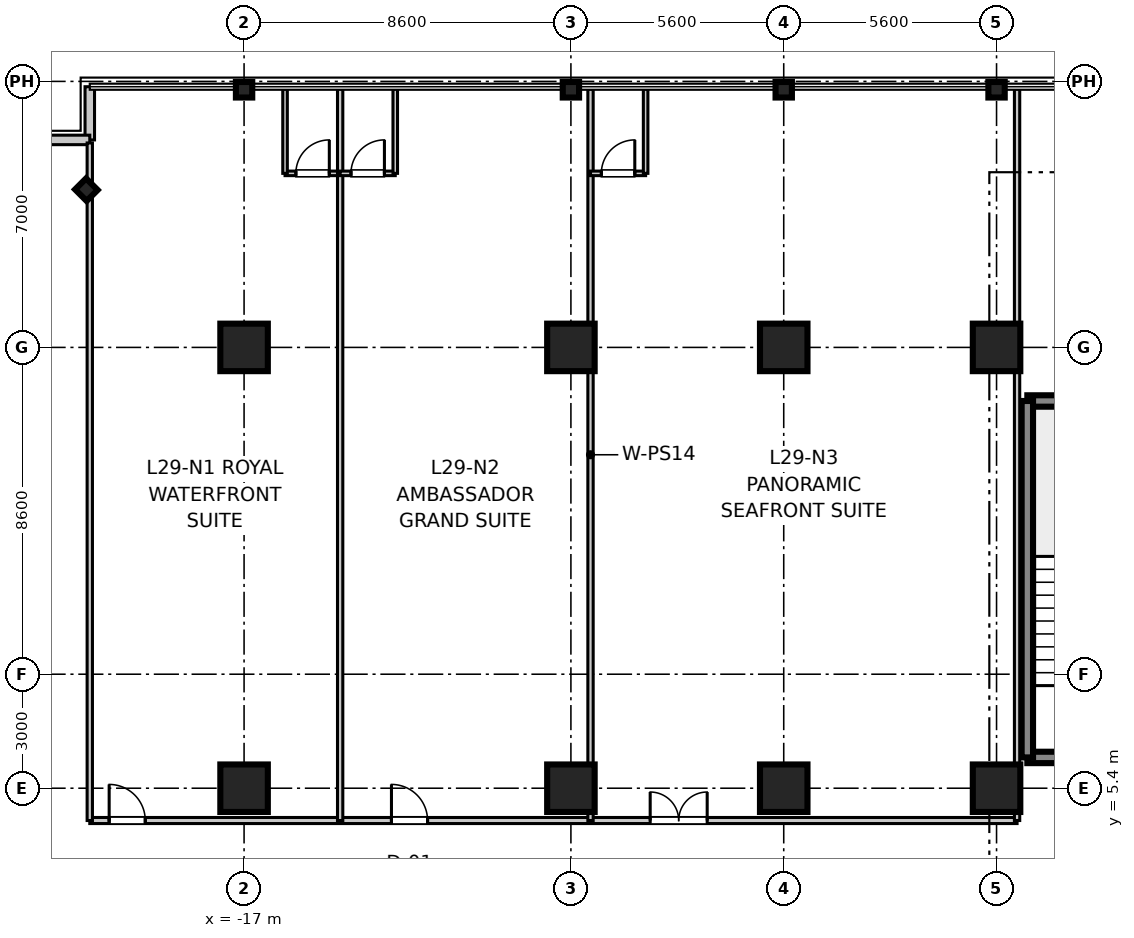
"""IFC4 building model, lengths in metres.
Left out: names, types, materials, properties, quantities, classifications, styles, units other than length and angle.
Written with IfcOpenShell. Run it as: python <this file> out.ifc"""

import sys

from ifc_helpers import new_model, si_unit, direction, frame, frame_2d, origin, origin_2d, place, context, subcontext, project, spatial, rectangle, i_section, extrude, source, transform, mapped, element, fill, save


model = new_model("IFC4")
c1 = context("Model", 3, precision=1e-05, world=origin(), true_north=direction((0.0, 1.0)))
c2 = subcontext(c1, "Body", "Model", "MODEL_VIEW")
j1 = project(units=[si_unit("LENGTHUNIT", "METRE"), si_unit("PLANEANGLEUNIT", "RADIAN")], contexts=[c1])
p1 = place(None, origin())
s1 = spatial("IfcSite", under=j1, at=p1, CompositionType="ELEMENT")
p2 = place(p1, origin())
s2 = spatial("IfcBuilding", under=s1, at=p2, CompositionType="ELEMENT")
p3 = place(p2, frame((0.0, 0.0, 117.5)))
s3 = spatial("IfcBuildingStorey", under=s2, at=p3, CompositionType="ELEMENT", Elevation=117.5)
m1 = source(origin(), c2, "Body", "SweptSolid", [
    extrude(rectangle(XDim=1.25, YDim=1.25, at=origin_2d()), origin(), (0.0, 0.0, 1.0), 3.605),
])
for number, where, z_axis, x_axis in (
    (1, (-17.0, 5.4, 0.0), (0.0, 0.0, 1.0), (1.0, 0.0, 0.0)),
    (2, (-17.0, 17.0, 0.0), (0.0, 0.0, 1.0), (1.0, 0.0, 0.0)),
    (3, (-8.4, 5.4, 0.0), (0.0, 0.0, 1.0), (1.0, 0.0, 0.0)),
    (4, (-8.4, 17.0, 0.0), (0.0, 0.0, 1.0), (1.0, 0.0, 0.0)),
    (5, (-2.8, 5.4, 0.0), (0.0, 0.0, 1.0), (1.0, 0.0, 0.0)),
    (6, (-2.8, 17.0, 0.0), (0.0, 0.0, 1.0), (1.0, 0.0, 0.0)),
    (7, (2.8, 5.4, 0.0), (0.0, 0.0, 1.0), (1.0, 0.0, 0.0)),
    (8, (2.8, 17.0, 0.0), (0.0, 0.0, 1.0), (1.0, 0.0, 0.0)),
):
    element("IfcColumn", number, at=place(p3, frame(where, z_axis=z_axis, x_axis=x_axis)), inside=s3, PredefinedType="COLUMN", context=c2, shape_type="MappedRepresentation", body=[
        mapped(m1, transform((0.0, 0.0, 0.0), scale=1.0)),
    ])
m2 = source(origin(), c2, "Body", "SweptSolid", [
    extrude(i_section(OverallWidth=0.409, OverallDepth=0.43, WebThickness=0.021, FlangeThickness=0.034, at=origin_2d()), origin(), (0.0, 0.0, 1.0), 3.605),
])
for number, where, z_axis, x_axis in (
    (9, (-17.0, 23.78, 0.0), (0.0, 0.0, 1.0), (0.0, 1.0, 0.0)),
    (10, (-8.4, 23.78, 0.0), (0.0, 0.0, 1.0), (0.0, 1.0, 0.0)),
    (11, (-2.8, 23.78, 0.0), (0.0, 0.0, 1.0), (0.0, 1.0, 0.0)),
    (12, (2.8, 23.78, 0.0), (0.0, 0.0, 1.0), (0.0, 1.0, 0.0)),
    (13, (-21.15, 21.15, 0.0), (0.0, 0.0, 1.0), (0.707, 0.707, 0.0)),
):
    element("IfcColumn", number, at=place(p3, frame(where, z_axis=z_axis, x_axis=x_axis)), inside=s3, PredefinedType="COLUMN", context=c2, shape_type="MappedRepresentation", body=[
        mapped(m2, transform((0.0, 0.0, 0.0), scale=1.0)),
    ])
m3 = source(origin(), c2, "Body", "SweptSolid", [
    extrude(rectangle(XDim=3.98, YDim=0.3, at=frame_2d((1.99, 0.0))), origin(), (0.0, 0.0, 1.0), 3.38),
])
for number, where, z_axis, x_axis in (
    (14, (3.61, 6.21, 0.0), (0.0, 0.0, 1.0), (1.0, 0.0, 0.0)),
    (15, (3.61, 15.59, 0.0), (0.0, 0.0, 1.0), (1.0, 0.0, 0.0)),
):
    element("IfcWall", number, at=place(p3, frame(where, z_axis=z_axis, x_axis=x_axis)), inside=s3, PredefinedType="SHEAR", context=c2, shape_type="MappedRepresentation", body=[
        mapped(m3, transform((0.0, 0.0, 0.0), scale=1.0)),
    ])
m4 = source(origin(), c2, "Body", "SweptSolid", [
    extrude(rectangle(XDim=9.38, YDim=0.3, at=frame_2d((4.69, 0.0))), origin(), (0.0, 0.0, 1.0), 3.38),
])
p4 = place(p3, frame((3.61, 6.21, 0.0), z_axis=(0.0, 0.0, 1.0), x_axis=(0.0, 1.0, 0.0)))
e16 = element("IfcWall", 16, at=p4, inside=s3, PredefinedType="SHEAR", context=c2, shape_type="MappedRepresentation", body=[
    mapped(m4, transform((0.0, 0.0, 0.0), scale=1.0)),
])
m5 = source(origin(), c2, "Body", "SweptSolid", [
    extrude(rectangle(XDim=1.4, YDim=0.25, at=frame_2d((0.7, 0.0))), origin(), (0.0, 0.0, 1.0), 3.38),
])
p5 = place(p3, frame((-21.06, 22.46, 0.0), z_axis=(0.0, 0.0, 1.0), x_axis=(0.0, 1.0, 0.0)))
e17 = element("IfcWall", 17, at=p5, inside=s3, PredefinedType="STANDARD", context=c2, shape_type="MappedRepresentation", body=[
    mapped(m5, transform((0.0, 0.0, 0.0), scale=1.0)),
])
m6 = source(origin(), c2, "Body", "SweptSolid", [
    extrude(rectangle(XDim=1.4, YDim=0.25, at=frame_2d((0.7, 0.0))), origin(), (0.0, 0.0, 1.0), 3.38),
])
p6 = place(p3, frame((-22.46, 22.46, 0.0), z_axis=(0.0, 0.0, 1.0), x_axis=(1.0, 0.0, 0.0)))
e18 = element("IfcWall", 18, at=p6, inside=s3, PredefinedType="STANDARD", context=c2, shape_type="MappedRepresentation", body=[
    mapped(m6, transform((0.0, 0.0, 0.0), scale=1.0)),
])
m7 = source(origin(), c2, "Body", "SweptSolid", [
    extrude(rectangle(XDim=24.4, YDim=0.16, at=frame_2d((12.2, 0.0))), origin(), (0.0, 0.0, 1.0), 2.72),
])
p7 = place(p3, frame((-21.06, 4.55, 0.0), z_axis=(0.0, 0.0, 1.0), x_axis=(1.0, 0.0, 0.0)))
e19 = element("IfcWall", 19, at=p7, inside=s3, PredefinedType="PARTITIONING", context=c2, shape_type="MappedRepresentation", body=[
    mapped(m7, transform((0.0, 0.0, 0.0), scale=1.0)),
])
p8 = place(p7, frame((0.51, 0.0, 0.0)))
e20 = element("IfcOpeningElement", 20, at=p8, cuts=e19, PredefinedType="OPENING", context=c2, shape_type="SweptSolid", body=[
    extrude(rectangle(XDim=0.95, YDim=2.1, at=frame_2d((0.475, 1.05))), frame((0.0, 0.09, 0.0), z_axis=(0.0, -1.0, 0.0), x_axis=(1.0, 0.0, 0.0)), (0.0, 0.0, 1.0), 0.18),
])
p9 = place(p7, frame((7.938, 0.0, 0.0)))
e21 = element("IfcOpeningElement", 21, at=p9, cuts=e19, PredefinedType="OPENING", context=c2, shape_type="SweptSolid", body=[
    extrude(rectangle(XDim=0.95, YDim=2.1, at=frame_2d((0.475, 1.05))), frame((0.0, 0.09, 0.0), z_axis=(0.0, -1.0, 0.0), x_axis=(1.0, 0.0, 0.0)), (0.0, 0.0, 1.0), 0.18),
])
p10 = place(p7, frame((14.746, 0.0, 0.0)))
e22 = element("IfcOpeningElement", 22, at=p10, cuts=e19, PredefinedType="OPENING", context=c2, shape_type="SweptSolid", body=[
    extrude(rectangle(XDim=1.5, YDim=2.15, at=frame_2d((0.75, 1.075))), frame((0.0, 0.09, 0.0), z_axis=(0.0, -1.0, 0.0), x_axis=(1.0, 0.0, 0.0)), (0.0, 0.0, 1.0), 0.18),
])
m8 = source(origin(), c2, "Body", "SweptSolid", [
    extrude(rectangle(XDim=17.83, YDim=0.14, at=frame_2d((8.915, 0.0))), origin(), (0.0, 0.0, 1.0), 2.72),
])
p11 = place(p3, frame((-21.06, 4.55, 0.0), z_axis=(0.0, 0.0, 1.0), x_axis=(0.0, 1.0, 0.0)))
e23 = element("IfcWall", 23, at=p11, inside=s3, PredefinedType="PARTITIONING", context=c2, shape_type="MappedRepresentation", body=[
    mapped(m8, transform((0.0, 0.0, 0.0), scale=1.0)),
])
m9 = source(origin(), c2, "Body", "SweptSolid", [
    extrude(rectangle(XDim=19.25, YDim=0.14, at=frame_2d((9.625, 0.0))), origin(), (0.0, 0.0, 1.0), 2.72),
])
p12 = place(p3, frame((3.34, 4.55, 0.0), z_axis=(0.0, 0.0, 1.0), x_axis=(0.0, 1.0, 0.0)))
e24 = element("IfcWall", 24, at=p12, inside=s3, PredefinedType="PARTITIONING", context=c2, shape_type="MappedRepresentation", body=[
    mapped(m9, transform((0.0, 0.0, 0.0), scale=1.0)),
])
m10 = source(origin(), c2, "Body", "SweptSolid", [
    extrude(rectangle(XDim=1.45, YDim=0.12, at=frame_2d((0.725, 0.0))), origin(), (0.0, 0.0, 1.0), 2.72),
])
p13 = place(p3, frame((-15.922, 21.58, 0.0), z_axis=(0.0, 0.0, 1.0), x_axis=(1.0, 0.0, 0.0)))
e25 = element("IfcWall", 25, at=p13, inside=s3, PredefinedType="PARTITIONING", context=c2, shape_type="MappedRepresentation", body=[
    mapped(m10, transform((0.0, 0.0, 0.0), scale=1.0)),
])
p14 = place(p13, frame((0.285, 0.0, 0.0)))
e26 = element("IfcOpeningElement", 26, at=p14, cuts=e25, PredefinedType="OPENING", context=c2, shape_type="SweptSolid", body=[
    extrude(rectangle(XDim=0.88, YDim=2.1, at=frame_2d((0.44, 1.05))), frame((0.0, 0.07, 0.0), z_axis=(0.0, -1.0, 0.0), x_axis=(1.0, 0.0, 0.0)), (0.0, 0.0, 1.0), 0.14),
])
m11 = source(origin(), c2, "Body", "SweptSolid", [
    extrude(rectangle(XDim=2.22, YDim=0.12, at=frame_2d((1.11, 0.0))), origin(), (0.0, 0.0, 1.0), 2.72),
])
p15 = place(p3, frame((-15.922, 21.58, 0.0), z_axis=(0.0, 0.0, 1.0), x_axis=(0.0, 1.0, 0.0)))
e27 = element("IfcWall", 27, at=p15, inside=s3, PredefinedType="PARTITIONING", context=c2, shape_type="MappedRepresentation", body=[
    mapped(m11, transform((0.0, 0.0, 0.0), scale=1.0)),
])
p16 = place(p3, frame((-14.472, 4.55, 0.0), z_axis=(0.0, 0.0, 1.0), x_axis=(0.0, 1.0, 0.0)))
e28 = element("IfcWall", 28, at=p16, inside=s3, PredefinedType="PARTITIONING", context=c2, shape_type="MappedRepresentation", body=[
    mapped(m9, transform((0.0, 0.0, 0.0), scale=1.0)),
])
m12 = source(origin(), c2, "Body", "SweptSolid", [
    extrude(rectangle(XDim=1.45, YDim=0.12, at=frame_2d((0.725, 0.0))), origin(), (0.0, 0.0, 1.0), 2.72),
])
p17 = place(p3, frame((-14.472, 21.58, 0.0), z_axis=(0.0, 0.0, 1.0), x_axis=(1.0, 0.0, 0.0)))
e29 = element("IfcWall", 29, at=p17, inside=s3, PredefinedType="PARTITIONING", context=c2, shape_type="MappedRepresentation", body=[
    mapped(m12, transform((0.0, 0.0, 0.0), scale=1.0)),
])
p18 = place(p17, frame((0.285, 0.0, 0.0)))
e30 = element("IfcOpeningElement", 30, at=p18, cuts=e29, PredefinedType="OPENING", context=c2, shape_type="SweptSolid", body=[
    extrude(rectangle(XDim=0.88, YDim=2.1, at=frame_2d((0.44, 1.05))), frame((0.0, 0.07, 0.0), z_axis=(0.0, -1.0, 0.0), x_axis=(1.0, 0.0, 0.0)), (0.0, 0.0, 1.0), 0.14),
])
p19 = place(p3, frame((-13.022, 21.58, 0.0), z_axis=(0.0, 0.0, 1.0), x_axis=(0.0, 1.0, 0.0)))
e31 = element("IfcWall", 31, at=p19, inside=s3, PredefinedType="PARTITIONING", context=c2, shape_type="MappedRepresentation", body=[
    mapped(m11, transform((0.0, 0.0, 0.0), scale=1.0)),
])
p20 = place(p3, frame((-7.884, 4.55, 0.0), z_axis=(0.0, 0.0, 1.0), x_axis=(0.0, 1.0, 0.0)))
e32 = element("IfcWall", 32, at=p20, inside=s3, PredefinedType="PARTITIONING", context=c2, shape_type="MappedRepresentation", body=[
    mapped(m9, transform((0.0, 0.0, 0.0), scale=1.0)),
])
p21 = place(p3, frame((-7.884, 21.58, 0.0), z_axis=(0.0, 0.0, 1.0), x_axis=(1.0, 0.0, 0.0)))
e33 = element("IfcWall", 33, at=p21, inside=s3, PredefinedType="PARTITIONING", context=c2, shape_type="MappedRepresentation", body=[
    mapped(m12, transform((0.0, 0.0, 0.0), scale=1.0)),
])
p22 = place(p21, frame((0.285, 0.0, 0.0)))
e34 = element("IfcOpeningElement", 34, at=p22, cuts=e33, PredefinedType="OPENING", context=c2, shape_type="SweptSolid", body=[
    extrude(rectangle(XDim=0.88, YDim=2.1, at=frame_2d((0.44, 1.05))), frame((0.0, 0.07, 0.0), z_axis=(0.0, -1.0, 0.0), x_axis=(1.0, 0.0, 0.0)), (0.0, 0.0, 1.0), 0.14),
])
p23 = place(p3, frame((-6.434, 21.58, 0.0), z_axis=(0.0, 0.0, 1.0), x_axis=(0.0, 1.0, 0.0)))
e35 = element("IfcWall", 35, at=p23, inside=s3, PredefinedType="PARTITIONING", context=c2, shape_type="MappedRepresentation", body=[
    mapped(m11, transform((0.0, 0.0, 0.0), scale=1.0)),
])
m13 = source(origin(), c2, "Body", "SweptSolid", [
    extrude(rectangle(XDim=0.88, YDim=2.1, at=frame_2d((0.44, 1.05))), frame((0.0, 0.025, 0.0), z_axis=(0.0, -1.0, 0.0), x_axis=(1.0, 0.0, 0.0)), (0.0, 0.0, 1.0), 0.05),
])
p24 = place(p14, origin())
e36 = element("IfcDoor", 36, at=p24, inside=s3, OperationType="SINGLE_SWING_RIGHT", PredefinedType="DOOR", context=c2, shape_type="MappedRepresentation", body=[
    mapped(m13, transform((0.0, 0.0, 0.0), scale=1.0)),
])
fill(e26, e36)
m14 = source(origin(), c2, "Body", "SweptSolid", [
    extrude(rectangle(XDim=0.95, YDim=2.1, at=frame_2d((0.475, 1.05))), frame((0.0, 0.025, 0.0), z_axis=(0.0, -1.0, 0.0), x_axis=(1.0, 0.0, 0.0)), (0.0, 0.0, 1.0), 0.05),
])
p25 = place(p8, origin())
e37 = element("IfcDoor", 37, at=p25, inside=s3, OperationType="SINGLE_SWING_LEFT", PredefinedType="DOOR", context=c2, shape_type="MappedRepresentation", body=[
    mapped(m14, transform((0.0, 0.0, 0.0), scale=1.0)),
])
fill(e20, e37)
p26 = place(p18, origin())
e38 = element("IfcDoor", 38, at=p26, inside=s3, OperationType="SINGLE_SWING_RIGHT", PredefinedType="DOOR", context=c2, shape_type="MappedRepresentation", body=[
    mapped(m13, transform((0.0, 0.0, 0.0), scale=1.0)),
])
fill(e30, e38)
p27 = place(p9, origin())
e39 = element("IfcDoor", 39, at=p27, inside=s3, OperationType="SINGLE_SWING_LEFT", PredefinedType="DOOR", context=c2, shape_type="MappedRepresentation", body=[
    mapped(m14, transform((0.0, 0.0, 0.0), scale=1.0)),
])
fill(e21, e39)
p28 = place(p22, origin())
e40 = element("IfcDoor", 40, at=p28, inside=s3, OperationType="SINGLE_SWING_RIGHT", PredefinedType="DOOR", context=c2, shape_type="MappedRepresentation", body=[
    mapped(m13, transform((0.0, 0.0, 0.0), scale=1.0)),
])
fill(e34, e40)
m15 = source(origin(), c2, "Body", "SweptSolid", [
    extrude(rectangle(XDim=1.5, YDim=2.15, at=frame_2d((0.75, 1.075))), frame((0.0, 0.025, 0.0), z_axis=(0.0, -1.0, 0.0), x_axis=(1.0, 0.0, 0.0)), (0.0, 0.0, 1.0), 0.05),
])
p29 = place(p10, origin())
e41 = element("IfcDoor", 41, at=p29, inside=s3, OperationType="DOUBLE_DOOR_SINGLE_SWING", PredefinedType="DOOR", context=c2, shape_type="MappedRepresentation", body=[
    mapped(m15, transform((0.0, 0.0, 0.0), scale=1.0)),
])
fill(e22, e41)
save(model, sys.argv[1])
